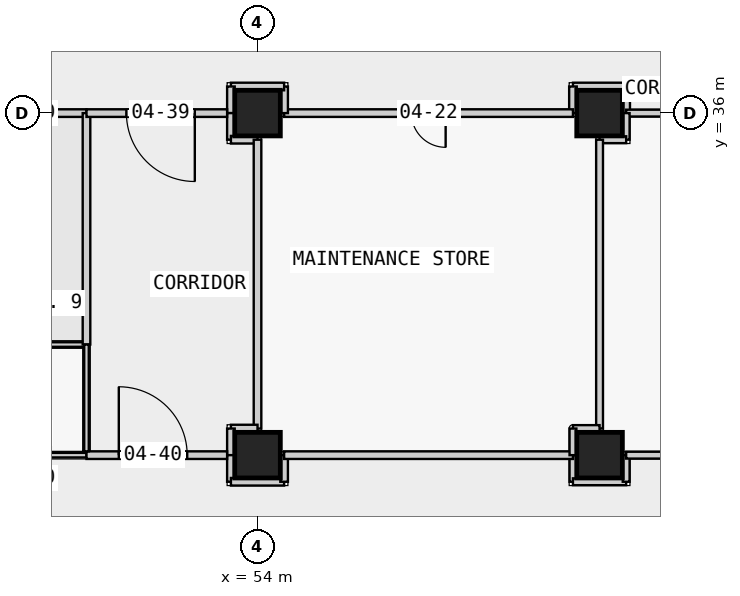
"""IFC4 building model, lengths in metres.
Left out: names, types, materials, properties, quantities, classifications, styles, units other than length and angle.
Written with IfcOpenShell. Run it as: python <this file> out.ifc"""

import sys

from ifc_helpers import new_model, si_unit, direction, frame, frame_2d, origin, origin_2d, place, context, subcontext, project, spatial, rectangle, extrude, element, fill, save


model = new_model("IFC4")
c1 = context("Model", 3, precision=1e-05, world=origin(), true_north=direction((0.0, 1.0)))
c2 = subcontext(c1, "Body", "Model", "MODEL_VIEW")
j1 = project(units=[si_unit("LENGTHUNIT", "METRE"), si_unit("PLANEANGLEUNIT", "RADIAN")], contexts=[c1])
p1 = place(None, origin())
s1 = spatial("IfcSite", under=j1, at=p1, CompositionType="ELEMENT")
p2 = place(p1, origin())
s2 = spatial("IfcBuilding", under=s1, at=p2, CompositionType="ELEMENT")
p3 = place(p2, frame((0.0, 0.0, 21.8)))
s3 = spatial("IfcBuildingStorey", under=s2, at=p3, CompositionType="ELEMENT", Elevation=21.8)
for number, where, z_axis, x_axis in (
    (1, (54.0, 27.0, 0.0), (0.0, 0.0, 1.0), (1.0, 0.0, 0.0)),
    (2, (54.0, 36.0, 0.0), (0.0, 0.0, 1.0), (1.0, 0.0, 0.0)),
    (3, (63.0, 27.0, 0.0), (0.0, 0.0, 1.0), (1.0, 0.0, 0.0)),
    (4, (63.0, 36.0, 0.0), (0.0, 0.0, 1.0), (1.0, 0.0, 0.0)),
):
    element("IfcColumn", number, at=place(p3, frame(where, z_axis=z_axis, x_axis=x_axis)), inside=s3, PredefinedType="COLUMN", context=c2, shape_type="SweptSolid", body=[
        extrude(rectangle(XDim=1.2, YDim=1.2, at=origin_2d()), origin(), (0.0, 0.0, 1.0), 5.0),
    ])
p4 = place(p3, frame((49.5, 36.0, 0.0), z_axis=(0.0, 0.0, 1.0), x_axis=(-1.0, 0.0, 0.0)))
e5 = element("IfcWall", 5, at=p4, inside=s3, PredefinedType="PARTITIONING", context=c2, shape_type="SweptSolid", body=[
    extrude(rectangle(XDim=3.8, YDim=0.2, at=frame_2d((1.9, 0.0))), origin(), (0.0, 0.0, 1.0), 4.5),
])
p5 = place(p4, frame((1.35, 0.0, 0.0)))
e6 = element("IfcOpeningElement", 6, at=p5, cuts=e5, PredefinedType="OPENING", context=c2, shape_type="SweptSolid", body=[
    extrude(rectangle(XDim=1.1, YDim=2.1, at=frame_2d((0.55, 1.05))), frame((0.0, 0.11, 0.0), z_axis=(0.0, -1.0, 0.0), x_axis=(1.0, 0.0, 0.0)), (0.0, 0.0, 1.0), 0.22),
])
p6 = place(p3, frame((63.7, 36.0, 0.0), z_axis=(0.0, 0.0, 1.0), x_axis=(0.0, 1.0, 0.0)))
e7 = element("IfcWall", 7, at=p6, inside=s3, PredefinedType="PARTITIONING", context=c2, shape_type="SweptSolid", body=[
    extrude(rectangle(XDim=0.7, YDim=0.2, at=frame_2d((0.35, 0.0))), origin(), (0.0, 0.0, 1.0), 4.5),
])
p7 = place(p3, frame((63.7, 36.7, 0.0), z_axis=(0.0, 0.0, 1.0), x_axis=(-1.0, 0.0, 0.0)))
e8 = element("IfcWall", 8, at=p7, inside=s3, PredefinedType="PARTITIONING", context=c2, shape_type="SweptSolid", body=[
    extrude(rectangle(XDim=1.4, YDim=0.2, at=frame_2d((0.7, 0.0))), origin(), (0.0, 0.0, 1.0), 4.5),
])
p8 = place(p3, frame((62.3, 36.7, 0.0), z_axis=(0.0, 0.0, 1.0), x_axis=(0.0, -1.0, 0.0)))
e9 = element("IfcWall", 9, at=p8, inside=s3, PredefinedType="PARTITIONING", context=c2, shape_type="SweptSolid", body=[
    extrude(rectangle(XDim=0.7, YDim=0.2, at=frame_2d((0.35, 0.0))), origin(), (0.0, 0.0, 1.0), 4.5),
])
p9 = place(p3, frame((62.3, 36.0, 0.0), z_axis=(0.0, 0.0, 1.0), x_axis=(-1.0, 0.0, 0.0)))
e10 = element("IfcWall", 10, at=p9, inside=s3, PredefinedType="PARTITIONING", context=c2, shape_type="SweptSolid", body=[
    extrude(rectangle(XDim=7.6, YDim=0.2, at=frame_2d((3.8, 0.0))), origin(), (0.0, 0.0, 1.0), 4.5),
])
p10 = place(p9, frame((3.35, 0.0, 0.0)))
e11 = element("IfcOpeningElement", 11, at=p10, cuts=e10, PredefinedType="OPENING", context=c2, shape_type="SweptSolid", body=[
    extrude(rectangle(XDim=0.9, YDim=2.1, at=frame_2d((0.45, 1.05))), frame((0.0, 0.11, 0.0), z_axis=(0.0, -1.0, 0.0), x_axis=(1.0, 0.0, 0.0)), (0.0, 0.0, 1.0), 0.22),
])
p11 = place(p3, frame((54.7, 36.0, 0.0), z_axis=(0.0, 0.0, 1.0), x_axis=(0.0, 1.0, 0.0)))
e12 = element("IfcWall", 12, at=p11, inside=s3, PredefinedType="PARTITIONING", context=c2, shape_type="SweptSolid", body=[
    extrude(rectangle(XDim=0.7, YDim=0.2, at=frame_2d((0.35, 0.0))), origin(), (0.0, 0.0, 1.0), 4.5),
])
p12 = place(p3, frame((54.7, 36.7, 0.0), z_axis=(0.0, 0.0, 1.0), x_axis=(-1.0, 0.0, 0.0)))
e13 = element("IfcWall", 13, at=p12, inside=s3, PredefinedType="PARTITIONING", context=c2, shape_type="SweptSolid", body=[
    extrude(rectangle(XDim=1.4, YDim=0.2, at=frame_2d((0.7, 0.0))), origin(), (0.0, 0.0, 1.0), 4.5),
])
p13 = place(p3, frame((53.3, 36.7, 0.0), z_axis=(0.0, 0.0, 1.0), x_axis=(0.0, -1.0, 0.0)))
e14 = element("IfcWall", 14, at=p13, inside=s3, PredefinedType="PARTITIONING", context=c2, shape_type="SweptSolid", body=[
    extrude(rectangle(XDim=0.7, YDim=0.2, at=frame_2d((0.35, 0.0))), origin(), (0.0, 0.0, 1.0), 4.5),
])
p14 = place(p3, frame((62.3, 27.0, 0.0), z_axis=(0.0, 0.0, 1.0), x_axis=(0.0, -1.0, 0.0)))
e15 = element("IfcWall", 15, at=p14, inside=s3, PredefinedType="PARTITIONING", context=c2, shape_type="SweptSolid", body=[
    extrude(rectangle(XDim=0.7, YDim=0.18, at=frame_2d((0.35, 0.0))), origin(), (0.0, 0.0, 1.0), 4.5),
])
p15 = place(p3, frame((62.3, 26.3, 0.0), z_axis=(0.0, 0.0, 1.0), x_axis=(1.0, 0.0, 0.0)))
e16 = element("IfcWall", 16, at=p15, inside=s3, PredefinedType="PARTITIONING", context=c2, shape_type="SweptSolid", body=[
    extrude(rectangle(XDim=1.4, YDim=0.18, at=frame_2d((0.7, 0.0))), origin(), (0.0, 0.0, 1.0), 4.5),
])
p16 = place(p3, frame((63.7, 26.3, 0.0), z_axis=(0.0, 0.0, 1.0), x_axis=(0.0, 1.0, 0.0)))
e17 = element("IfcWall", 17, at=p16, inside=s3, PredefinedType="PARTITIONING", context=c2, shape_type="SweptSolid", body=[
    extrude(rectangle(XDim=0.7, YDim=0.18, at=frame_2d((0.35, 0.0))), origin(), (0.0, 0.0, 1.0), 4.5),
])
p17 = place(p3, frame((63.7, 27.0, 0.0), z_axis=(0.0, 0.0, 1.0), x_axis=(1.0, 0.0, 0.0)))
e18 = element("IfcWall", 18, at=p17, inside=s3, PredefinedType="PARTITIONING", context=c2, shape_type="SweptSolid", body=[
    extrude(rectangle(XDim=7.6, YDim=0.18, at=frame_2d((3.8, 0.0))), origin(), (0.0, 0.0, 1.0), 4.5),
])
p18 = place(p17, frame((3.1, 0.0, 0.0)))
e19 = element("IfcOpeningElement", 19, at=p18, cuts=e18, PredefinedType="OPENING", context=c2, shape_type="SweptSolid", body=[
    extrude(rectangle(XDim=1.6, YDim=2.4, at=frame_2d((0.8, 1.2))), frame((0.0, 0.1, 0.0), z_axis=(0.0, -1.0, 0.0), x_axis=(1.0, 0.0, 0.0)), (0.0, 0.0, 1.0), 0.2),
])
for number, where, z_axis, x_axis in (
    (20, (53.3, 36.0, 0.0), (0.0, 0.0, 1.0), (0.0, -1.0, 0.0)),
    (21, (53.3, 35.3, 0.0), (0.0, 0.0, 1.0), (1.0, 0.0, 0.0)),
):
    element("IfcWall", number, at=place(p3, frame(where, z_axis=z_axis, x_axis=x_axis)), inside=s3, PredefinedType="PARTITIONING", context=c2, shape_type="SweptSolid", body=[
        extrude(rectangle(XDim=0.7, YDim=0.2, at=frame_2d((0.35, 0.0))), origin(), (0.0, 0.0, 1.0), 4.5),
    ])
p19 = place(p3, frame((54.0, 35.3, 0.0), z_axis=(0.0, 0.0, 1.0), x_axis=(0.0, -1.0, 0.0)))
e22 = element("IfcWall", 22, at=p19, inside=s3, PredefinedType="PARTITIONING", context=c2, shape_type="SweptSolid", body=[
    extrude(rectangle(XDim=7.6, YDim=0.2, at=frame_2d((3.8, 0.0))), origin(), (0.0, 0.0, 1.0), 4.5),
])
for number, where, z_axis, x_axis in (
    (23, (54.0, 27.7, 0.0), (0.0, 0.0, 1.0), (-1.0, 0.0, 0.0)),
    (24, (53.3, 27.7, 0.0), (0.0, 0.0, 1.0), (0.0, -1.0, 0.0)),
):
    element("IfcWall", number, at=place(p3, frame(where, z_axis=z_axis, x_axis=x_axis)), inside=s3, PredefinedType="PARTITIONING", context=c2, shape_type="SweptSolid", body=[
        extrude(rectangle(XDim=0.7, YDim=0.2, at=frame_2d((0.35, 0.0))), origin(), (0.0, 0.0, 1.0), 4.5),
    ])
p20 = place(p3, frame((71.3, 36.0, 0.0), z_axis=(0.0, 0.0, 1.0), x_axis=(-1.0, 0.0, 0.0)))
e25 = element("IfcWall", 25, at=p20, inside=s3, PredefinedType="PARTITIONING", context=c2, shape_type="SweptSolid", body=[
    extrude(rectangle(XDim=7.6, YDim=0.18, at=frame_2d((3.8, 0.0))), origin(), (0.0, 0.0, 1.0), 4.5),
])
p21 = place(p3, frame((53.3, 27.0, 0.0), z_axis=(0.0, 0.0, 1.0), x_axis=(0.0, -1.0, 0.0)))
e26 = element("IfcWall", 26, at=p21, inside=s3, PredefinedType="PARTITIONING", context=c2, shape_type="SweptSolid", body=[
    extrude(rectangle(XDim=0.7, YDim=0.2, at=frame_2d((0.35, 0.0))), origin(), (0.0, 0.0, 1.0), 4.5),
])
p22 = place(p3, frame((53.3, 26.3, 0.0), z_axis=(0.0, 0.0, 1.0), x_axis=(1.0, 0.0, 0.0)))
e27 = element("IfcWall", 27, at=p22, inside=s3, PredefinedType="PARTITIONING", context=c2, shape_type="SweptSolid", body=[
    extrude(rectangle(XDim=1.4, YDim=0.2, at=frame_2d((0.7, 0.0))), origin(), (0.0, 0.0, 1.0), 4.5),
])
p23 = place(p3, frame((54.7, 26.3, 0.0), z_axis=(0.0, 0.0, 1.0), x_axis=(0.0, 1.0, 0.0)))
e28 = element("IfcWall", 28, at=p23, inside=s3, PredefinedType="PARTITIONING", context=c2, shape_type="SweptSolid", body=[
    extrude(rectangle(XDim=0.7, YDim=0.2, at=frame_2d((0.35, 0.0))), origin(), (0.0, 0.0, 1.0), 4.5),
])
p24 = place(p3, frame((54.7, 27.0, 0.0), z_axis=(0.0, 0.0, 1.0), x_axis=(1.0, 0.0, 0.0)))
e29 = element("IfcWall", 29, at=p24, inside=s3, PredefinedType="PARTITIONING", context=c2, shape_type="SweptSolid", body=[
    extrude(rectangle(XDim=7.6, YDim=0.2, at=frame_2d((3.8, 0.0))), origin(), (0.0, 0.0, 1.0), 4.5),
])
for number, where, z_axis, x_axis in (
    (30, (63.7, 36.0, 0.0), (0.0, 0.0, 1.0), (0.0, -1.0, 0.0)),
    (31, (63.7, 35.3, 0.0), (0.0, 0.0, 1.0), (-1.0, 0.0, 0.0)),
):
    element("IfcWall", number, at=place(p3, frame(where, z_axis=z_axis, x_axis=x_axis)), inside=s3, PredefinedType="PARTITIONING", context=c2, shape_type="SweptSolid", body=[
        extrude(rectangle(XDim=0.7, YDim=0.18, at=frame_2d((0.35, 0.0))), origin(), (0.0, 0.0, 1.0), 4.5),
    ])
p25 = place(p3, frame((63.0, 35.3, 0.0), z_axis=(0.0, 0.0, 1.0), x_axis=(0.0, -1.0, 0.0)))
e32 = element("IfcWall", 32, at=p25, inside=s3, PredefinedType="PARTITIONING", context=c2, shape_type="SweptSolid", body=[
    extrude(rectangle(XDim=7.6, YDim=0.18, at=frame_2d((3.8, 0.0))), origin(), (0.0, 0.0, 1.0), 4.5),
])
for number, where, z_axis, x_axis in (
    (33, (63.0, 27.7, 0.0), (0.0, 0.0, 1.0), (-1.0, 0.0, 0.0)),
    (34, (62.3, 27.7, 0.0), (0.0, 0.0, 1.0), (0.0, -1.0, 0.0)),
):
    element("IfcWall", number, at=place(p3, frame(where, z_axis=z_axis, x_axis=x_axis)), inside=s3, PredefinedType="PARTITIONING", context=c2, shape_type="SweptSolid", body=[
        extrude(rectangle(XDim=0.7, YDim=0.18, at=frame_2d((0.35, 0.0))), origin(), (0.0, 0.0, 1.0), 4.5),
    ])
p26 = place(p3, frame((49.5, 29.911, 0.0), z_axis=(0.0, 0.0, 1.0), x_axis=(-1.0, 0.0, 0.0)))
e35 = element("IfcWall", 35, at=p26, inside=s3, PredefinedType="PARTITIONING", context=c2, shape_type="SweptSolid", body=[
    extrude(rectangle(XDim=4.5, YDim=0.12, at=frame_2d((2.25, 0.0))), origin(), (0.0, 0.0, 1.0), 4.5),
])
p27 = place(p3, frame((45.7, 27.0, 0.0), z_axis=(0.0, 0.0, 1.0), x_axis=(1.0, 0.0, 0.0)))
e36 = element("IfcWall", 36, at=p27, inside=s3, PredefinedType="PARTITIONING", context=c2, shape_type="SweptSolid", body=[
    extrude(rectangle(XDim=3.8, YDim=0.12, at=frame_2d((1.9, 0.0))), origin(), (0.0, 0.0, 1.0), 4.5),
])
p28 = place(p27, frame((1.35, 0.0, 0.0)))
e37 = element("IfcOpeningElement", 37, at=p28, cuts=e36, PredefinedType="OPENING", context=c2, shape_type="SweptSolid", body=[
    extrude(rectangle(XDim=1.0, YDim=2.1, at=frame_2d((0.5, 1.05))), frame((0.0, 0.07, 0.0), z_axis=(0.0, -1.0, 0.0), x_axis=(1.0, 0.0, 0.0)), (0.0, 0.0, 1.0), 0.14),
])
p29 = place(p3, frame((49.5, 29.911, 0.0), z_axis=(0.0, 0.0, 1.0), x_axis=(0.0, 1.0, 0.0)))
e38 = element("IfcWall", 38, at=p29, inside=s3, PredefinedType="PARTITIONING", context=c2, shape_type="SweptSolid", body=[
    extrude(rectangle(XDim=6.089, YDim=0.2, at=frame_2d((3.044, 0.0))), origin(), (0.0, 0.0, 1.0), 4.5),
])
p30 = place(p3, frame((53.2, 36.0, 0.0), z_axis=(0.0, 0.0, 1.0), x_axis=(-1.0, 0.0, 0.0)))
e39 = element("IfcWall", 39, at=p30, inside=s3, PredefinedType="PARTITIONING", context=c2, shape_type="SweptSolid", body=[
    extrude(rectangle(XDim=3.7, YDim=0.2, at=frame_2d((1.85, 0.0))), origin(), (0.0, 0.0, 1.0), 4.5),
])
p31 = place(p30, frame((0.85, 0.0, 0.0)))
e40 = element("IfcOpeningElement", 40, at=p31, cuts=e39, PredefinedType="OPENING", context=c2, shape_type="SweptSolid", body=[
    extrude(rectangle(XDim=1.8, YDim=2.1, at=frame_2d((0.9, 1.05))), frame((0.0, 0.11, 0.0), z_axis=(0.0, -1.0, 0.0), x_axis=(1.0, 0.0, 0.0)), (0.0, 0.0, 1.0), 0.22),
])
p32 = place(p3, frame((49.5, 27.0, 0.0), z_axis=(0.0, 0.0, 1.0), x_axis=(1.0, 0.0, 0.0)))
e41 = element("IfcWall", 41, at=p32, inside=s3, PredefinedType="PARTITIONING", context=c2, shape_type="SweptSolid", body=[
    extrude(rectangle(XDim=3.7, YDim=0.2, at=frame_2d((1.85, 0.0))), origin(), (0.0, 0.0, 1.0), 4.5),
])
p33 = place(p32, frame((0.85, 0.0, 0.0)))
e42 = element("IfcOpeningElement", 42, at=p33, cuts=e41, PredefinedType="OPENING", context=c2, shape_type="SweptSolid", body=[
    extrude(rectangle(XDim=1.8, YDim=2.1, at=frame_2d((0.9, 1.05))), frame((0.0, 0.11, 0.0), z_axis=(0.0, -1.0, 0.0), x_axis=(1.0, 0.0, 0.0)), (0.0, 0.0, 1.0), 0.22),
])
p34 = place(p3, frame((49.5, 27.1, 0.0), z_axis=(0.0, 0.0, 1.0), x_axis=(0.0, 1.0, 0.0)))
e43 = element("IfcWall", 43, at=p34, inside=s3, PredefinedType="PARTITIONING", context=c2, shape_type="SweptSolid", body=[
    extrude(rectangle(XDim=2.811, YDim=0.12, at=frame_2d((1.405, 0.0))), origin(), (0.0, 0.0, 1.0), 4.5),
])
p35 = place(p10, origin())
e44 = element("IfcDoor", 44, at=p35, inside=s3, OperationType="SINGLE_SWING_LEFT", PredefinedType="DOOR", context=c2, shape_type="SweptSolid", body=[
    extrude(rectangle(XDim=0.9, YDim=2.1, at=frame_2d((0.45, 1.05))), frame((0.0, 0.025, 0.0), z_axis=(0.0, -1.0, 0.0), x_axis=(1.0, 0.0, 0.0)), (0.0, 0.0, 1.0), 0.05),
])
fill(e11, e44)
p36 = place(p31, origin())
e45 = element("IfcDoor", 45, at=p36, inside=s3, OperationType="DOUBLE_DOOR_SINGLE_SWING", PredefinedType="DOOR", context=c2, shape_type="SweptSolid", body=[
    extrude(rectangle(XDim=1.8, YDim=2.1, at=frame_2d((0.9, 1.05))), frame((0.0, 0.025, 0.0), z_axis=(0.0, -1.0, 0.0), x_axis=(1.0, 0.0, 0.0)), (0.0, 0.0, 1.0), 0.05),
])
fill(e40, e45)
p37 = place(p33, origin())
e46 = element("IfcDoor", 46, at=p37, inside=s3, OperationType="DOUBLE_DOOR_SINGLE_SWING", PredefinedType="DOOR", context=c2, shape_type="SweptSolid", body=[
    extrude(rectangle(XDim=1.8, YDim=2.1, at=frame_2d((0.9, 1.05))), frame((0.0, 0.025, 0.0), z_axis=(0.0, -1.0, 0.0), x_axis=(1.0, 0.0, 0.0)), (0.0, 0.0, 1.0), 0.05),
])
fill(e42, e46)
save(model, sys.argv[1])
